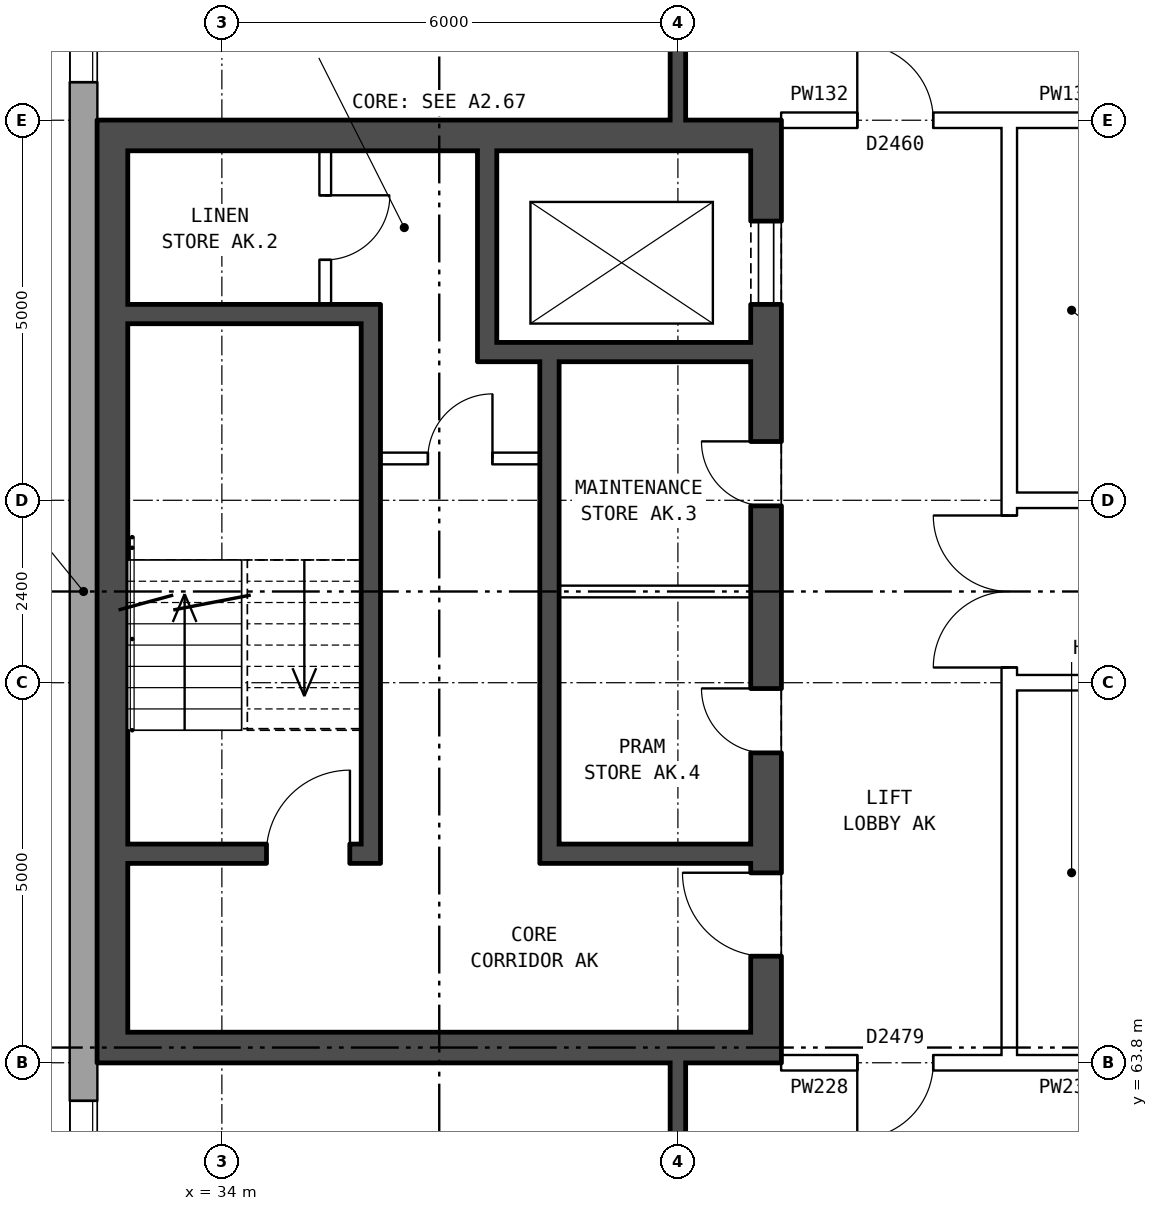
"""IFC4 building model, lengths in metres.
Left out: names, types, materials, properties, quantities, classifications, styles, units other than length and angle.
Written with IfcOpenShell. Run it as: python <this file> out.ifc"""

import sys

from ifc_helpers import new_model, si_unit, direction, frame, frame_2d, origin, place, context, subcontext, project, spatial, rectangle, extrude, element, fill, save


model = new_model("IFC4")
c1 = context("Model", 3, precision=1e-05, world=origin(), true_north=direction((0.0, 1.0)))
c2 = subcontext(c1, "Body", "Model", "MODEL_VIEW")
j1 = project(units=[si_unit("LENGTHUNIT", "METRE"), si_unit("PLANEANGLEUNIT", "RADIAN")], contexts=[c1])
p1 = place(None, origin())
s1 = spatial("IfcSite", under=j1, at=p1, CompositionType="ELEMENT")
p2 = place(p1, origin())
s2 = spatial("IfcBuilding", under=s1, at=p2, CompositionType="ELEMENT")
p3 = place(p2, frame((0.0, 0.0, 233.8)))
s3 = spatial("IfcBuildingStorey", under=s2, at=p3, CompositionType="ELEMENT", Elevation=233.8)
p4 = place(p3, frame((32.18, 82.925, 0.0), z_axis=(0.0, 0.0, 1.0), x_axis=(0.0, -1.0, 0.0)))
e1 = element("IfcWall", 1, at=p4, inside=s3, PredefinedType="STANDARD", context=c2, shape_type="SweptSolid", body=[
    extrude(rectangle(XDim=25.851, YDim=0.36, at=frame_2d((12.925, 0.0))), origin(), (0.0, 0.0, 1.0), 2.85),
])
p5 = place(p4, frame((1.625, 0.0, 0.8)))
e2 = element("IfcOpeningElement", 2, at=p5, cuts=e1, PredefinedType="OPENING", context=c2, shape_type="SweptSolid", body=[
    extrude(rectangle(XDim=1.6, YDim=1.8, at=frame_2d((0.8, 0.9))), frame((0.0, 0.19, 0.0), z_axis=(0.0, -1.0, 0.0), x_axis=(1.0, 0.0, 0.0)), (0.0, 0.0, 1.0), 0.38),
])
p6 = place(p4, frame((4.625, 0.0, 0.8)))
e3 = element("IfcOpeningElement", 3, at=p6, cuts=e1, PredefinedType="OPENING", context=c2, shape_type="SweptSolid", body=[
    extrude(rectangle(XDim=1.6, YDim=1.8, at=frame_2d((0.8, 0.9))), frame((0.0, 0.19, 0.0), z_axis=(0.0, -1.0, 0.0), x_axis=(1.0, 0.0, 0.0)), (0.0, 0.0, 1.0), 0.38),
])
p7 = place(p4, frame((19.625, 0.0, 0.8)))
e4 = element("IfcOpeningElement", 4, at=p7, cuts=e1, PredefinedType="OPENING", context=c2, shape_type="SweptSolid", body=[
    extrude(rectangle(XDim=1.6, YDim=1.8, at=frame_2d((0.8, 0.9))), frame((0.0, 0.19, 0.0), z_axis=(0.0, -1.0, 0.0), x_axis=(1.0, 0.0, 0.0)), (0.0, 0.0, 1.0), 0.38),
])
p8 = place(p4, frame((22.625, 0.0, 0.8)))
e5 = element("IfcOpeningElement", 5, at=p8, cuts=e1, PredefinedType="OPENING", context=c2, shape_type="SweptSolid", body=[
    extrude(rectangle(XDim=1.6, YDim=1.8, at=frame_2d((0.8, 0.9))), frame((0.0, 0.19, 0.0), z_axis=(0.0, -1.0, 0.0), x_axis=(1.0, 0.0, 0.0)), (0.0, 0.0, 1.0), 0.38),
])
p9 = place(p3, frame((41.16, 76.2, 0.0), z_axis=(0.0, 0.0, 1.0), x_axis=(0.0, -1.0, 0.0)))
e6 = element("IfcWall", 6, at=p9, inside=s3, PredefinedType="SHEAR", context=c2, shape_type="SweptSolid", body=[
    extrude(rectangle(XDim=12.4, YDim=0.4, at=frame_2d((6.2, 0.0))), origin(), (0.0, 0.0, 1.0), 2.85),
])
p10 = place(p9, frame((1.325, 0.0, 0.0)))
e7 = element("IfcOpeningElement", 7, at=p10, cuts=e6, PredefinedType="OPENING", context=c2, shape_type="SweptSolid", body=[
    extrude(rectangle(XDim=1.1, YDim=2.1, at=frame_2d((0.55, 1.05))), frame((0.0, 0.21, 0.0), z_axis=(0.0, -1.0, 0.0), x_axis=(1.0, 0.0, 0.0)), (0.0, 0.0, 1.0), 0.42),
])
p11 = place(p9, frame((4.225, 0.0, 0.0)))
e8 = element("IfcOpeningElement", 8, at=p11, cuts=e6, PredefinedType="OPENING", context=c2, shape_type="SweptSolid", body=[
    extrude(rectangle(XDim=0.85, YDim=2.1, at=frame_2d((0.425, 1.05))), frame((0.0, 0.21, 0.0), z_axis=(0.0, -1.0, 0.0), x_axis=(1.0, 0.0, 0.0)), (0.0, 0.0, 1.0), 0.42),
])
p12 = place(p9, frame((7.475, 0.0, 0.0)))
e9 = element("IfcOpeningElement", 9, at=p12, cuts=e6, PredefinedType="OPENING", context=c2, shape_type="SweptSolid", body=[
    extrude(rectangle(XDim=0.85, YDim=2.1, at=frame_2d((0.425, 1.05))), frame((0.0, 0.21, 0.0), z_axis=(0.0, -1.0, 0.0), x_axis=(1.0, 0.0, 0.0)), (0.0, 0.0, 1.0), 0.42),
])
p13 = place(p9, frame((9.9, 0.0, 0.0)))
e10 = element("IfcOpeningElement", 10, at=p13, cuts=e6, PredefinedType="OPENING", context=c2, shape_type="SweptSolid", body=[
    extrude(rectangle(XDim=1.1, YDim=2.1, at=frame_2d((0.55, 1.05))), frame((0.0, 0.21, 0.0), z_axis=(0.0, -1.0, 0.0), x_axis=(1.0, 0.0, 0.0)), (0.0, 0.0, 1.0), 0.42),
])
p14 = place(p3, frame((32.56, 76.2, 0.0), z_axis=(0.0, 0.0, 1.0), x_axis=(0.0, -1.0, 0.0)))
e11 = element("IfcWall", 11, at=p14, inside=s3, PredefinedType="SHEAR", context=c2, shape_type="SweptSolid", body=[
    extrude(rectangle(XDim=12.4, YDim=0.4, at=frame_2d((6.2, 0.0))), origin(), (0.0, 0.0, 1.0), 2.85),
])
for number, where, z_axis, x_axis in (
    (12, (40.96, 76.0, 0.0), (0.0, 0.0, 1.0), (-1.0, 0.0, 0.0)),
    (13, (40.96, 64.0, 0.0), (0.0, 0.0, 1.0), (-1.0, 0.0, 0.0)),
):
    element("IfcWall", number, at=place(p3, frame(where, z_axis=z_axis, x_axis=x_axis)), inside=s3, PredefinedType="SHEAR", context=c2, shape_type="SweptSolid", body=[
        extrude(rectangle(XDim=8.2, YDim=0.4, at=frame_2d((4.1, 0.0))), origin(), (0.0, 0.0, 1.0), 2.85),
    ])
p15 = place(p3, frame((35.835, 73.65, 0.0), z_axis=(0.0, 0.0, 1.0), x_axis=(-1.0, 0.0, 0.0)))
e14 = element("IfcWall", 14, at=p15, inside=s3, PredefinedType="SHEAR", context=c2, shape_type="SweptSolid", body=[
    extrude(rectangle(XDim=3.075, YDim=0.25, at=frame_2d((1.538, 0.0))), origin(), (0.0, 0.0, 1.0), 2.85),
])
p16 = place(p3, frame((40.96, 73.15, 0.0), z_axis=(0.0, 0.0, 1.0), x_axis=(-1.0, 0.0, 0.0)))
e15 = element("IfcWall", 15, at=p16, inside=s3, PredefinedType="SHEAR", context=c2, shape_type="SweptSolid", body=[
    extrude(rectangle(XDim=3.595, YDim=0.25, at=frame_2d((1.797, 0.0))), origin(), (0.0, 0.0, 1.0), 2.85),
])
p17 = place(p3, frame((38.185, 71.75, 0.0), z_axis=(0.0, 0.0, 1.0), x_axis=(-1.0, 0.0, 0.0)))
e16 = element("IfcWall", 16, at=p17, inside=s3, PredefinedType="PARTITIONING", context=c2, shape_type="SweptSolid", body=[
    extrude(rectangle(XDim=2.1, YDim=0.15, at=frame_2d((1.05, 0.0))), origin(), (0.0, 0.0, 1.0), 2.85),
])
p18 = place(p17, frame((0.625, 0.0, 0.0)))
e17 = element("IfcOpeningElement", 17, at=p18, cuts=e16, PredefinedType="OPENING", context=c2, shape_type="SweptSolid", body=[
    extrude(rectangle(XDim=0.85, YDim=2.1, at=frame_2d((0.425, 1.05))), frame((0.0, 0.085, 0.0), z_axis=(0.0, -1.0, 0.0), x_axis=(1.0, 0.0, 0.0)), (0.0, 0.0, 1.0), 0.17),
])
p19 = place(p3, frame((40.96, 70.0, 0.0), z_axis=(0.0, 0.0, 1.0), x_axis=(-1.0, 0.0, 0.0)))
e18 = element("IfcWall", 18, at=p19, inside=s3, PredefinedType="PARTITIONING", context=c2, shape_type="SweptSolid", body=[
    extrude(rectangle(XDim=2.525, YDim=0.15, at=frame_2d((1.262, 0.0))), origin(), (0.0, 0.0, 1.0), 2.85),
])
p20 = place(p3, frame((40.96, 66.55, 0.0), z_axis=(0.0, 0.0, 1.0), x_axis=(-1.0, 0.0, 0.0)))
e19 = element("IfcWall", 19, at=p20, inside=s3, PredefinedType="SHEAR", context=c2, shape_type="SweptSolid", body=[
    extrude(rectangle(XDim=2.525, YDim=0.25, at=frame_2d((1.262, 0.0))), origin(), (0.0, 0.0, 1.0), 2.85),
])
p21 = place(p3, frame((35.835, 66.55, 0.0), z_axis=(0.0, 0.0, 1.0), x_axis=(-1.0, 0.0, 0.0)))
e20 = element("IfcWall", 20, at=p21, inside=s3, PredefinedType="SHEAR", context=c2, shape_type="SweptSolid", body=[
    extrude(rectangle(XDim=3.075, YDim=0.25, at=frame_2d((1.538, 0.0))), origin(), (0.0, 0.0, 1.0), 2.85),
])
p22 = place(p21, frame((0.15, 0.0, 0.0)))
e21 = element("IfcOpeningElement", 21, at=p22, cuts=e20, PredefinedType="OPENING", context=c2, shape_type="SweptSolid", body=[
    extrude(rectangle(XDim=1.1, YDim=2.1, at=frame_2d((0.55, 1.05))), frame((0.0, 0.135, 0.0), z_axis=(0.0, -1.0, 0.0), x_axis=(1.0, 0.0, 0.0)), (0.0, 0.0, 1.0), 0.27),
])
p23 = place(p3, frame((38.31, 73.025, 0.0), z_axis=(0.0, 0.0, 1.0), x_axis=(0.0, -1.0, 0.0)))
e22 = element("IfcWall", 22, at=p23, inside=s3, PredefinedType="SHEAR", context=c2, shape_type="SweptSolid", body=[
    extrude(rectangle(XDim=6.6, YDim=0.25, at=frame_2d((3.3, 0.0))), origin(), (0.0, 0.0, 1.0), 2.85),
])
p24 = place(p3, frame((37.49, 75.8, 0.0), z_axis=(0.0, 0.0, 1.0), x_axis=(0.0, -1.0, 0.0)))
e23 = element("IfcWall", 23, at=p24, inside=s3, PredefinedType="SHEAR", context=c2, shape_type="SweptSolid", body=[
    extrude(rectangle(XDim=2.525, YDim=0.25, at=frame_2d((1.263, 0.0))), origin(), (0.0, 0.0, 1.0), 2.85),
])
p25 = place(p3, frame((35.96, 73.775, 0.0), z_axis=(0.0, 0.0, 1.0), x_axis=(0.0, -1.0, 0.0)))
e24 = element("IfcWall", 24, at=p25, inside=s3, PredefinedType="SHEAR", context=c2, shape_type="SweptSolid", body=[
    extrude(rectangle(XDim=7.35, YDim=0.25, at=frame_2d((3.675, 0.0))), origin(), (0.0, 0.0, 1.0), 2.85),
])
p26 = place(p3, frame((35.36, 75.8, 0.0), z_axis=(0.0, 0.0, 1.0), x_axis=(0.0, -1.0, 0.0)))
e25 = element("IfcWall", 25, at=p26, inside=s3, PredefinedType="PARTITIONING", context=c2, shape_type="SweptSolid", body=[
    extrude(rectangle(XDim=2.025, YDim=0.15, at=frame_2d((1.013, 0.0))), origin(), (0.0, 0.0, 1.0), 2.85),
])
p27 = place(p26, frame((0.587, 0.0, 0.0)))
e26 = element("IfcOpeningElement", 26, at=p27, cuts=e25, PredefinedType="OPENING", context=c2, shape_type="SweptSolid", body=[
    extrude(rectangle(XDim=0.85, YDim=2.1, at=frame_2d((0.425, 1.05))), frame((0.0, 0.085, 0.0), z_axis=(0.0, -1.0, 0.0), x_axis=(1.0, 0.0, 0.0)), (0.0, 0.0, 1.0), 0.17),
])
p28 = place(p3, frame((44.36, 63.9, 0.0), z_axis=(0.0, 0.0, 1.0), x_axis=(0.0, 1.0, 0.0)))
e27 = element("IfcWall", 27, at=p28, inside=s3, PredefinedType="PARTITIONING", context=c2, shape_type="SweptSolid", body=[
    extrude(rectangle(XDim=12.2, YDim=0.2, at=frame_2d((6.1, 0.0))), origin(), (0.0, 0.0, 1.0), 2.85),
])
p29 = place(p28, frame((5.1, 0.0, 0.0)))
e28 = element("IfcOpeningElement", 28, at=p29, cuts=e27, PredefinedType="OPENING", context=c2, shape_type="SweptSolid", body=[
    extrude(rectangle(XDim=2.0, YDim=2.1, at=frame_2d((1.0, 1.05))), frame((0.0, 0.11, 0.0), z_axis=(0.0, -1.0, 0.0), x_axis=(1.0, 0.0, 0.0)), (0.0, 0.0, 1.0), 0.22),
])
p30 = place(p3, frame((41.36, 63.8, 0.0), z_axis=(0.0, 0.0, 1.0), x_axis=(1.0, 0.0, 0.0)))
e29 = element("IfcWall", 29, at=p30, inside=s3, PredefinedType="PARTITIONING", context=c2, shape_type="SweptSolid", body=[
    extrude(rectangle(XDim=3.0, YDim=0.2, at=frame_2d((1.5, 0.0))), origin(), (0.0, 0.0, 1.0), 2.85),
])
p31 = place(p30, frame((1.0, 0.0, 0.0)))
e30 = element("IfcOpeningElement", 30, at=p31, cuts=e29, PredefinedType="OPENING", context=c2, shape_type="SweptSolid", body=[
    extrude(rectangle(XDim=1.0, YDim=2.1, at=frame_2d((0.5, 1.05))), frame((0.0, 0.11, 0.0), z_axis=(0.0, -1.0, 0.0), x_axis=(1.0, 0.0, 0.0)), (0.0, 0.0, 1.0), 0.22),
])
p32 = place(p3, frame((44.36, 63.8, 0.0), z_axis=(0.0, 0.0, 1.0), x_axis=(1.0, 0.0, 0.0)))
e31 = element("IfcWall", 31, at=p32, inside=s3, PredefinedType="PARTITIONING", context=c2, shape_type="SweptSolid", body=[
    extrude(rectangle(XDim=1.54, YDim=0.2, at=frame_2d((0.77, 0.0))), origin(), (0.0, 0.0, 1.0), 2.85),
])
p33 = place(p3, frame((44.36, 68.8, 0.0), z_axis=(0.0, 0.0, 1.0), x_axis=(1.0, 0.0, 0.0)))
e32 = element("IfcWall", 32, at=p33, inside=s3, PredefinedType="PARTITIONING", context=c2, shape_type="SweptSolid", body=[
    extrude(rectangle(XDim=19.28, YDim=0.2, at=frame_2d((9.64, 0.0))), origin(), (0.0, 0.0, 1.0), 2.85),
])
p34 = place(p33, frame((14.64, 0.0, 0.0)))
e33 = element("IfcOpeningElement", 33, at=p34, cuts=e32, PredefinedType="OPENING", context=c2, shape_type="SweptSolid", body=[
    extrude(rectangle(XDim=1.0, YDim=2.1, at=frame_2d((0.5, 1.05))), frame((0.0, 0.11, 0.0), z_axis=(0.0, -1.0, 0.0), x_axis=(1.0, 0.0, 0.0)), (0.0, 0.0, 1.0), 0.22),
])
p35 = place(p33, frame((5.64, 0.0, 0.0)))
e34 = element("IfcOpeningElement", 34, at=p35, cuts=e32, PredefinedType="OPENING", context=c2, shape_type="SweptSolid", body=[
    extrude(rectangle(XDim=1.0, YDim=2.1, at=frame_2d((0.5, 1.05))), frame((0.0, 0.11, 0.0), z_axis=(0.0, -1.0, 0.0), x_axis=(1.0, 0.0, 0.0)), (0.0, 0.0, 1.0), 0.22),
])
p36 = place(p3, frame((44.36, 71.2, 0.0), z_axis=(0.0, 0.0, 1.0), x_axis=(1.0, 0.0, 0.0)))
e35 = element("IfcWall", 35, at=p36, inside=s3, PredefinedType="PARTITIONING", context=c2, shape_type="SweptSolid", body=[
    extrude(rectangle(XDim=19.28, YDim=0.2, at=frame_2d((9.64, 0.0))), origin(), (0.0, 0.0, 1.0), 2.85),
])
p37 = place(p36, frame((14.64, 0.0, 0.0)))
e36 = element("IfcOpeningElement", 36, at=p37, cuts=e35, PredefinedType="OPENING", context=c2, shape_type="SweptSolid", body=[
    extrude(rectangle(XDim=1.0, YDim=2.1, at=frame_2d((0.5, 1.05))), frame((0.0, 0.11, 0.0), z_axis=(0.0, -1.0, 0.0), x_axis=(1.0, 0.0, 0.0)), (0.0, 0.0, 1.0), 0.22),
])
p38 = place(p36, frame((11.64, 0.0, 0.0)))
e37 = element("IfcOpeningElement", 37, at=p38, cuts=e35, PredefinedType="OPENING", context=c2, shape_type="SweptSolid", body=[
    extrude(rectangle(XDim=1.0, YDim=2.1, at=frame_2d((0.5, 1.05))), frame((0.0, 0.11, 0.0), z_axis=(0.0, -1.0, 0.0), x_axis=(1.0, 0.0, 0.0)), (0.0, 0.0, 1.0), 0.22),
])
p39 = place(p36, frame((2.64, 0.0, 0.0)))
e38 = element("IfcOpeningElement", 38, at=p39, cuts=e35, PredefinedType="OPENING", context=c2, shape_type="SweptSolid", body=[
    extrude(rectangle(XDim=1.0, YDim=2.1, at=frame_2d((0.5, 1.05))), frame((0.0, 0.11, 0.0), z_axis=(0.0, -1.0, 0.0), x_axis=(1.0, 0.0, 0.0)), (0.0, 0.0, 1.0), 0.22),
])
p40 = place(p3, frame((41.36, 76.2, 0.0), z_axis=(0.0, 0.0, 1.0), x_axis=(1.0, 0.0, 0.0)))
e39 = element("IfcWall", 39, at=p40, inside=s3, PredefinedType="PARTITIONING", context=c2, shape_type="SweptSolid", body=[
    extrude(rectangle(XDim=3.0, YDim=0.2, at=frame_2d((1.5, 0.0))), origin(), (0.0, 0.0, 1.0), 2.85),
])
p41 = place(p40, frame((1.0, 0.0, 0.0)))
e40 = element("IfcOpeningElement", 40, at=p41, cuts=e39, PredefinedType="OPENING", context=c2, shape_type="SweptSolid", body=[
    extrude(rectangle(XDim=1.0, YDim=2.1, at=frame_2d((0.5, 1.05))), frame((0.0, 0.11, 0.0), z_axis=(0.0, -1.0, 0.0), x_axis=(1.0, 0.0, 0.0)), (0.0, 0.0, 1.0), 0.22),
])
p42 = place(p3, frame((44.36, 76.2, 0.0), z_axis=(0.0, 0.0, 1.0), x_axis=(1.0, 0.0, 0.0)))
e41 = element("IfcWall", 41, at=p42, inside=s3, PredefinedType="PARTITIONING", context=c2, shape_type="SweptSolid", body=[
    extrude(rectangle(XDim=1.54, YDim=0.2, at=frame_2d((0.77, 0.0))), origin(), (0.0, 0.0, 1.0), 2.85),
])
p43 = place(p3, frame((40.0, 54.36, 0.0), z_axis=(0.0, 0.0, 1.0), x_axis=(0.0, 1.0, 0.0)))
e42 = element("IfcWall", 42, at=p43, inside=s3, PredefinedType="SOLIDWALL", context=c2, shape_type="SweptSolid", body=[
    extrude(rectangle(XDim=9.44, YDim=0.2, at=frame_2d((4.72, 0.0))), origin(), (0.0, 0.0, 1.0), 2.85),
])
p44 = place(p43, frame((7.19, 0.0, 0.0)))
e43 = element("IfcOpeningElement", 43, at=p44, cuts=e42, PredefinedType="OPENING", context=c2, shape_type="SweptSolid", body=[
    extrude(rectangle(XDim=0.9, YDim=2.1, at=frame_2d((0.45, 1.05))), frame((0.0, 0.11, 0.0), z_axis=(0.0, -1.0, 0.0), x_axis=(1.0, 0.0, 0.0)), (0.0, 0.0, 1.0), 0.22),
])
p45 = place(p3, frame((40.0, 76.2, 0.0), z_axis=(0.0, 0.0, 1.0), x_axis=(0.0, 1.0, 0.0)))
e44 = element("IfcWall", 44, at=p45, inside=s3, PredefinedType="SOLIDWALL", context=c2, shape_type="SweptSolid", body=[
    extrude(rectangle(XDim=9.44, YDim=0.2, at=frame_2d((4.72, 0.0))), origin(), (0.0, 0.0, 1.0), 2.85),
])
p46 = place(p45, frame((1.5, 0.0, 0.0)))
e45 = element("IfcOpeningElement", 45, at=p46, cuts=e44, PredefinedType="OPENING", context=c2, shape_type="SweptSolid", body=[
    extrude(rectangle(XDim=0.9, YDim=2.1, at=frame_2d((0.45, 1.05))), frame((0.0, 0.11, 0.0), z_axis=(0.0, -1.0, 0.0), x_axis=(1.0, 0.0, 0.0)), (0.0, 0.0, 1.0), 0.22),
])
p47 = place(p6, origin())
e46 = element("IfcWindow", 46, at=p47, inside=s3, PartitioningType="SINGLE_PANEL", PredefinedType="WINDOW", context=c2, shape_type="SweptSolid", body=[
    extrude(rectangle(XDim=1.6, YDim=1.8, at=frame_2d((0.8, 0.9))), frame((0.0, 0.15, 0.0), z_axis=(0.0, -1.0, 0.0), x_axis=(1.0, 0.0, 0.0)), (0.0, 0.0, 1.0), 0.06),
])
fill(e3, e46)
p48 = place(p7, origin())
e47 = element("IfcWindow", 47, at=p48, inside=s3, PartitioningType="SINGLE_PANEL", PredefinedType="WINDOW", context=c2, shape_type="SweptSolid", body=[
    extrude(rectangle(XDim=1.6, YDim=1.8, at=frame_2d((0.8, 0.9))), frame((0.0, 0.15, 0.0), z_axis=(0.0, -1.0, 0.0), x_axis=(1.0, 0.0, 0.0)), (0.0, 0.0, 1.0), 0.06),
])
fill(e4, e47)
p49 = place(p10, origin())
e48 = element("IfcDoor", 48, at=p49, inside=s3, OperationType="DOUBLE_DOOR_SLIDING", PredefinedType="DOOR", context=c2, shape_type="SweptSolid", body=[
    extrude(rectangle(XDim=1.1, YDim=2.1, at=frame_2d((0.55, 1.05))), frame((0.0, -0.135, 0.0), z_axis=(0.0, -1.0, 0.0), x_axis=(1.0, 0.0, 0.0)), (0.0, 0.0, 1.0), 0.05),
])
fill(e7, e48)
p50 = place(p11, frame((0.85, 0.0, 0.0), z_axis=(0.0, 0.0, 1.0), x_axis=(-1.0, 0.0, 0.0)))
e49 = element("IfcDoor", 49, at=p50, inside=s3, OperationType="SINGLE_SWING_RIGHT", PredefinedType="DOOR", context=c2, shape_type="SweptSolid", body=[
    extrude(rectangle(XDim=0.85, YDim=2.1, at=frame_2d((0.425, 1.05))), frame((0.0, 0.185, 0.0), z_axis=(0.0, -1.0, 0.0), x_axis=(1.0, 0.0, 0.0)), (0.0, 0.0, 1.0), 0.05),
])
fill(e8, e49)
p51 = place(p12, frame((0.85, 0.0, 0.0), z_axis=(0.0, 0.0, 1.0), x_axis=(-1.0, 0.0, 0.0)))
e50 = element("IfcDoor", 50, at=p51, inside=s3, OperationType="SINGLE_SWING_RIGHT", PredefinedType="DOOR", context=c2, shape_type="SweptSolid", body=[
    extrude(rectangle(XDim=0.85, YDim=2.1, at=frame_2d((0.425, 1.05))), frame((0.0, 0.185, 0.0), z_axis=(0.0, -1.0, 0.0), x_axis=(1.0, 0.0, 0.0)), (0.0, 0.0, 1.0), 0.05),
])
fill(e9, e50)
p52 = place(p13, frame((1.1, 0.0, 0.0), z_axis=(0.0, 0.0, 1.0), x_axis=(-1.0, 0.0, 0.0)))
e51 = element("IfcDoor", 51, at=p52, inside=s3, OperationType="SINGLE_SWING_RIGHT", PredefinedType="DOOR", context=c2, shape_type="SweptSolid", body=[
    extrude(rectangle(XDim=1.1, YDim=2.1, at=frame_2d((0.55, 1.05))), frame((0.0, 0.185, 0.0), z_axis=(0.0, -1.0, 0.0), x_axis=(1.0, 0.0, 0.0)), (0.0, 0.0, 1.0), 0.05),
])
fill(e10, e51)
p53 = place(p22, frame((1.1, 0.0, 0.0), z_axis=(0.0, 0.0, 1.0), x_axis=(-1.0, 0.0, 0.0)))
e52 = element("IfcDoor", 52, at=p53, inside=s3, OperationType="SINGLE_SWING_RIGHT", PredefinedType="DOOR", context=c2, shape_type="SweptSolid", body=[
    extrude(rectangle(XDim=1.1, YDim=2.1, at=frame_2d((0.55, 1.05))), frame((0.0, 0.025, 0.0), z_axis=(0.0, -1.0, 0.0), x_axis=(1.0, 0.0, 0.0)), (0.0, 0.0, 1.0), 0.05),
])
fill(e21, e52)
p54 = place(p18, frame((0.85, 0.0, 0.0), z_axis=(0.0, 0.0, 1.0), x_axis=(-1.0, 0.0, 0.0)))
e53 = element("IfcDoor", 53, at=p54, inside=s3, OperationType="SINGLE_SWING_RIGHT", PredefinedType="DOOR", context=c2, shape_type="SweptSolid", body=[
    extrude(rectangle(XDim=0.85, YDim=2.1, at=frame_2d((0.425, 1.05))), frame((0.0, 0.025, 0.0), z_axis=(0.0, -1.0, 0.0), x_axis=(1.0, 0.0, 0.0)), (0.0, 0.0, 1.0), 0.05),
])
fill(e17, e53)
p55 = place(p27, origin())
e54 = element("IfcDoor", 54, at=p55, inside=s3, OperationType="SINGLE_SWING_LEFT", PredefinedType="DOOR", context=c2, shape_type="SweptSolid", body=[
    extrude(rectangle(XDim=0.85, YDim=2.1, at=frame_2d((0.425, 1.05))), frame((0.0, 0.025, 0.0), z_axis=(0.0, -1.0, 0.0), x_axis=(1.0, 0.0, 0.0)), (0.0, 0.0, 1.0), 0.05),
])
fill(e26, e54)
p56 = place(p29, origin())
e55 = element("IfcDoor", 55, at=p56, inside=s3, OperationType="DOUBLE_DOOR_SINGLE_SWING", PredefinedType="DOOR", context=c2, shape_type="SweptSolid", body=[
    extrude(rectangle(XDim=2.0, YDim=2.1, at=frame_2d((1.0, 1.05))), frame((0.0, 0.025, 0.0), z_axis=(0.0, -1.0, 0.0), x_axis=(1.0, 0.0, 0.0)), (0.0, 0.0, 1.0), 0.05),
])
fill(e28, e55)
p57 = place(p31, frame((1.0, 0.0, 0.0), z_axis=(0.0, 0.0, 1.0), x_axis=(-1.0, 0.0, 0.0)))
e56 = element("IfcDoor", 56, at=p57, inside=s3, OperationType="SINGLE_SWING_RIGHT", PredefinedType="DOOR", context=c2, shape_type="SweptSolid", body=[
    extrude(rectangle(XDim=1.0, YDim=2.1, at=frame_2d((0.5, 1.05))), frame((0.0, 0.025, 0.0), z_axis=(0.0, -1.0, 0.0), x_axis=(1.0, 0.0, 0.0)), (0.0, 0.0, 1.0), 0.05),
])
fill(e30, e56)
p58 = place(p41, origin())
e57 = element("IfcDoor", 57, at=p58, inside=s3, OperationType="SINGLE_SWING_LEFT", PredefinedType="DOOR", context=c2, shape_type="SweptSolid", body=[
    extrude(rectangle(XDim=1.0, YDim=2.1, at=frame_2d((0.5, 1.05))), frame((0.0, 0.025, 0.0), z_axis=(0.0, -1.0, 0.0), x_axis=(1.0, 0.0, 0.0)), (0.0, 0.0, 1.0), 0.05),
])
fill(e40, e57)
save(model, sys.argv[1])
